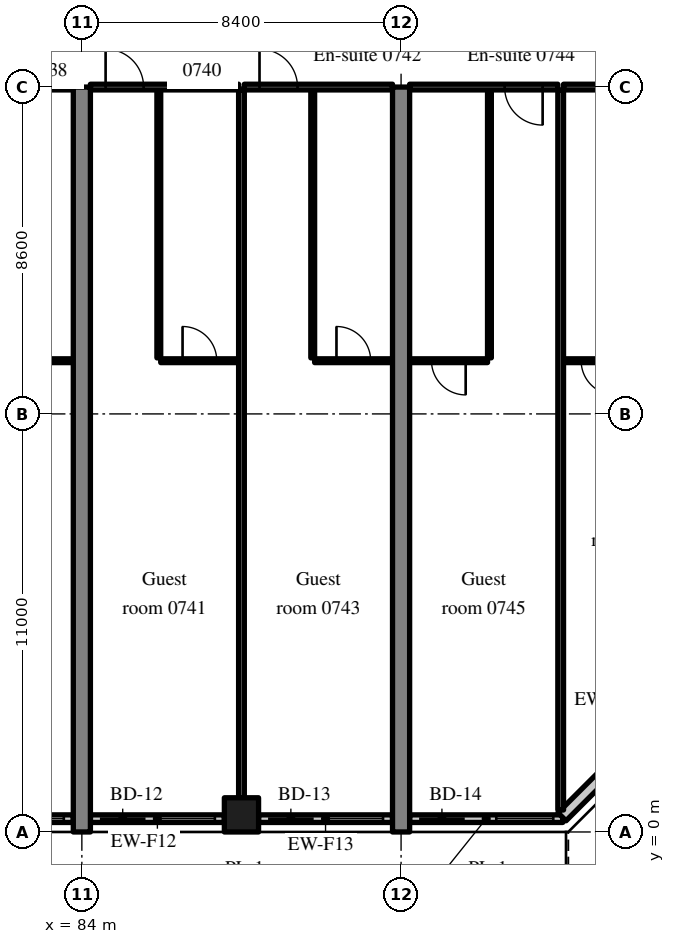
"""IFC4 building model, lengths in metres.
Left out: names, types, materials, properties, quantities, classifications, styles, units other than length and angle.
Written with IfcOpenShell. Run it as: python <this file> out.ifc"""

import sys

from ifc_helpers import new_model, si_unit, direction, frame, frame_2d, origin, origin_2d, place, context, subcontext, project, spatial, rectangle, extrude, source, transform, mapped, element, fill, save


model = new_model("IFC4")
c1 = context("Model", 3, precision=1e-05, world=origin(), true_north=direction((0.0, 1.0)))
c2 = subcontext(c1, "Body", "Model", "MODEL_VIEW")
j1 = project(units=[si_unit("LENGTHUNIT", "METRE"), si_unit("PLANEANGLEUNIT", "RADIAN")], contexts=[c1])
p1 = place(None, origin())
s1 = spatial("IfcSite", under=j1, at=p1, CompositionType="ELEMENT")
p2 = place(p1, origin())
s2 = spatial("IfcBuilding", under=s1, at=p2, CompositionType="ELEMENT")
p3 = place(p2, frame((0.0, 0.0, 35.4)))
s3 = spatial("IfcBuildingStorey", under=s2, at=p3, CompositionType="ELEMENT", Elevation=35.4)
m1 = source(origin(), c2, "Body", "SweptSolid", [
    extrude(rectangle(XDim=19.6, YDim=0.45, at=frame_2d((9.8, 0.0))), origin(), (0.0, 0.0, 1.0), 3.52),
])
for number, where, z_axis, x_axis in (
    (1, (84.0, 0.0, 0.0), (0.0, 0.0, 1.0), (0.0, 1.0, 0.0)),
    (2, (92.4, 0.0, 0.0), (0.0, 0.0, 1.0), (0.0, 1.0, 0.0)),
):
    element("IfcWall", number, at=place(p3, frame(where, z_axis=z_axis, x_axis=x_axis)), inside=s3, PredefinedType="SHEAR", context=c2, shape_type="MappedRepresentation", body=[
        mapped(m1, transform((0.0, 0.0, 0.0), scale=1.0)),
    ])
m2 = source(origin(), c2, "Body", "SweptSolid", [
    extrude(rectangle(XDim=0.9, YDim=0.9, at=origin_2d()), origin(), (0.0, 0.0, 1.0), 3.52),
])
p4 = place(p3, frame((88.2, 0.45, 0.0), z_axis=(0.0, 0.0, 1.0), x_axis=(1.0, 0.0, 0.0)))
e3 = element("IfcColumn", 3, at=p4, inside=s3, PredefinedType="COLUMN", context=c2, shape_type="MappedRepresentation", body=[
    mapped(m2, transform((0.0, 0.0, 0.0), scale=1.0)),
])
m3 = source(origin(), c2, "Body", "SweptSolid", [
    extrude(rectangle(XDim=3.525, YDim=0.2, at=frame_2d((1.762, 0.0))), origin(), (0.0, 0.0, 1.0), 2.77),
])
p5 = place(p3, frame((80.25, 0.35, 0.0), z_axis=(0.0, 0.0, 1.0), x_axis=(1.0, 0.0, 0.0)))
e4 = element("IfcWall", 4, at=p5, inside=s3, PredefinedType="SOLIDWALL", context=c2, shape_type="MappedRepresentation", body=[
    mapped(m3, transform((0.0, 0.0, 0.0), scale=1.0)),
])
m4 = source(origin(), c2, "Body", "SweptSolid", [
    extrude(rectangle(XDim=1.2, YDim=2.4, at=frame_2d((0.6, 1.2))), frame((0.0, 0.11, 0.0), z_axis=(0.0, -1.0, 0.0), x_axis=(1.0, 0.0, 0.0)), (0.0, 0.0, 1.0), 0.22),
])
p6 = place(p5, frame((0.25, 0.0, 0.0)))
e5 = element("IfcOpeningElement", 5, at=p6, cuts=e4, PredefinedType="OPENING", context=c2, shape_type="MappedRepresentation", body=[
    mapped(m4, transform((0.0, 0.0, 0.0), scale=1.0)),
])
m5 = source(origin(), c2, "Body", "SweptSolid", [
    extrude(rectangle(XDim=1.5, YDim=1.5, at=frame_2d((0.75, 0.75))), frame((0.0, 0.11, 0.0), z_axis=(0.0, -1.0, 0.0), x_axis=(1.0, 0.0, 0.0)), (0.0, 0.0, 1.0), 0.22),
])
p7 = place(p5, frame((1.775, 0.0, 0.9)))
e6 = element("IfcOpeningElement", 6, at=p7, cuts=e4, PredefinedType="OPENING", context=c2, shape_type="MappedRepresentation", body=[
    mapped(m5, transform((0.0, 0.0, 0.0), scale=1.0)),
])
p8 = place(p3, frame((84.225, 0.35, 0.0), z_axis=(0.0, 0.0, 1.0), x_axis=(1.0, 0.0, 0.0)))
e7 = element("IfcWall", 7, at=p8, inside=s3, PredefinedType="SOLIDWALL", context=c2, shape_type="MappedRepresentation", body=[
    mapped(m3, transform((0.0, 0.0, 0.0), scale=1.0)),
])
p9 = place(p8, frame((0.25, 0.0, 0.0)))
e8 = element("IfcOpeningElement", 8, at=p9, cuts=e7, PredefinedType="OPENING", context=c2, shape_type="MappedRepresentation", body=[
    mapped(m4, transform((0.0, 0.0, 0.0), scale=1.0)),
])
p10 = place(p8, frame((1.775, 0.0, 0.9)))
e9 = element("IfcOpeningElement", 9, at=p10, cuts=e7, PredefinedType="OPENING", context=c2, shape_type="MappedRepresentation", body=[
    mapped(m5, transform((0.0, 0.0, 0.0), scale=1.0)),
])
m6 = source(origin(), c2, "Body", "SweptSolid", [
    extrude(rectangle(XDim=3.525, YDim=0.2, at=frame_2d((1.763, 0.0))), origin(), (0.0, 0.0, 1.0), 2.77),
])
p11 = place(p3, frame((88.65, 0.35, 0.0), z_axis=(0.0, 0.0, 1.0), x_axis=(1.0, 0.0, 0.0)))
e10 = element("IfcWall", 10, at=p11, inside=s3, PredefinedType="SOLIDWALL", context=c2, shape_type="MappedRepresentation", body=[
    mapped(m6, transform((0.0, 0.0, 0.0), scale=1.0)),
])
p12 = place(p11, frame((0.25, 0.0, 0.0)))
e11 = element("IfcOpeningElement", 11, at=p12, cuts=e10, PredefinedType="OPENING", context=c2, shape_type="MappedRepresentation", body=[
    mapped(m4, transform((0.0, 0.0, 0.0), scale=1.0)),
])
p13 = place(p11, frame((1.775, 0.0, 0.9)))
e12 = element("IfcOpeningElement", 12, at=p13, cuts=e10, PredefinedType="OPENING", context=c2, shape_type="MappedRepresentation", body=[
    mapped(m5, transform((0.0, 0.0, 0.0), scale=1.0)),
])
m7 = source(origin(), c2, "Body", "SweptSolid", [
    extrude(rectangle(XDim=4.03, YDim=0.2, at=frame_2d((2.015, 0.0))), origin(), (0.0, 0.0, 1.0), 2.77),
])
p14 = place(p3, frame((92.625, 0.35, 0.0), z_axis=(0.0, 0.0, 1.0), x_axis=(1.0, 0.0, 0.0)))
e13 = element("IfcWall", 13, at=p14, inside=s3, PredefinedType="SOLIDWALL", context=c2, shape_type="MappedRepresentation", body=[
    mapped(m7, transform((0.0, 0.0, 0.0), scale=1.0)),
])
p15 = place(p14, frame((0.25, 0.0, 0.0)))
e14 = element("IfcOpeningElement", 14, at=p15, cuts=e13, PredefinedType="OPENING", context=c2, shape_type="MappedRepresentation", body=[
    mapped(m4, transform((0.0, 0.0, 0.0), scale=1.0)),
])
p16 = place(p14, frame((2.28, 0.0, 0.9)))
e15 = element("IfcOpeningElement", 15, at=p16, cuts=e13, PredefinedType="OPENING", context=c2, shape_type="MappedRepresentation", body=[
    mapped(m5, transform((0.0, 0.0, 0.0), scale=1.0)),
])
m8 = source(origin(), c2, "Body", "SweptSolid", [
    extrude(rectangle(XDim=5.326, YDim=0.3, at=frame_2d((2.663, 0.0))), origin(), (0.0, 0.0, 1.0), 3.52),
])
p17 = place(p3, frame((96.634, 0.4, 0.0), z_axis=(0.0, 0.0, 1.0), x_axis=(0.707083859269, 0.707129702361, 0.0)))
e16 = element("IfcWall", 16, at=p17, inside=s3, PredefinedType="SOLIDWALL", context=c2, shape_type="MappedRepresentation", body=[
    mapped(m8, transform((0.0, 0.0, 0.0), scale=1.0)),
])
m9 = source(origin(), c2, "Body", "SweptSolid", [
    extrude(rectangle(XDim=1.8, YDim=1.5, at=frame_2d((0.9, 0.75))), frame((0.0, 0.16, 0.0), z_axis=(0.0, -1.0, 0.0), x_axis=(1.0, 0.0, 0.0)), (0.0, 0.0, 1.0), 0.32),
])
p18 = place(p17, frame((1.636, 0.0, 0.9)))
e17 = element("IfcOpeningElement", 17, at=p18, cuts=e16, PredefinedType="OPENING", context=c2, shape_type="MappedRepresentation", body=[
    mapped(m9, transform((0.0, 0.0, 0.0), scale=1.0)),
])
m10 = source(origin(), c2, "Body", "SweptSolid", [
    extrude(rectangle(XDim=2.05, YDim=0.1, at=frame_2d((1.025, 0.0))), origin(), (0.0, 0.0, 1.0), 3.52),
])
p19 = place(p3, frame((81.725, 12.4, 0.0), z_axis=(0.0, 0.0, 1.0), x_axis=(1.0, 0.0, 0.0)))
e18 = element("IfcWall", 18, at=p19, inside=s3, PredefinedType="PARTITIONING", context=c2, shape_type="MappedRepresentation", body=[
    mapped(m10, transform((0.0, 0.0, 0.0), scale=1.0)),
])
m11 = source(origin(), c2, "Body", "SweptSolid", [
    extrude(rectangle(XDim=0.9, YDim=2.1, at=frame_2d((0.45, 1.05))), frame((0.0, 0.06, 0.0), z_axis=(0.0, -1.0, 0.0), x_axis=(1.0, 0.0, 0.0)), (0.0, 0.0, 1.0), 0.12),
])
p20 = place(p19, frame((0.575, 0.0, 0.0)))
e19 = element("IfcOpeningElement", 19, at=p20, cuts=e18, PredefinedType="OPENING", context=c2, shape_type="MappedRepresentation", body=[
    mapped(m11, transform((0.0, 0.0, 0.0), scale=1.0)),
])
m12 = source(origin(), c2, "Body", "SweptSolid", [
    extrude(rectangle(XDim=3.9, YDim=0.15, at=frame_2d((1.95, 0.0))), origin(), (0.0, 0.0, 1.0), 2.82),
])
p21 = place(p3, frame((79.875, 19.6, 0.0), z_axis=(0.0, 0.0, 1.0), x_axis=(1.0, 0.0, 0.0)))
e20 = element("IfcWall", 20, at=p21, inside=s3, PredefinedType="PARTITIONING", context=c2, shape_type="MappedRepresentation", body=[
    mapped(m12, transform((0.0, 0.0, 0.0), scale=1.0)),
])
m13 = source(origin(), c2, "Body", "SweptSolid", [
    extrude(rectangle(XDim=1.0, YDim=2.1, at=frame_2d((0.5, 1.05))), frame((0.0, 0.085, 0.0), z_axis=(0.0, -1.0, 0.0), x_axis=(1.0, 0.0, 0.0)), (0.0, 0.0, 1.0), 0.17),
])
p22 = place(p21, frame((0.4, 0.0, 0.0)))
e21 = element("IfcOpeningElement", 21, at=p22, cuts=e20, PredefinedType="OPENING", context=c2, shape_type="MappedRepresentation", body=[
    mapped(m13, transform((0.0, 0.0, 0.0), scale=1.0)),
])
m14 = source(origin(), c2, "Body", "SweptSolid", [
    extrude(rectangle(XDim=7.05, YDim=0.1, at=frame_2d((3.525, 0.0))), origin(), (0.0, 0.0, 1.0), 3.52),
])
p23 = place(p3, frame((86.025, 12.475, 0.0), z_axis=(0.0, 0.0, 1.0), x_axis=(0.0, 1.0, 0.0)))
e22 = element("IfcWall", 22, at=p23, inside=s3, PredefinedType="PARTITIONING", context=c2, shape_type="MappedRepresentation", body=[
    mapped(m14, transform((0.0, 0.0, 0.0), scale=1.0)),
])
m15 = source(origin(), c2, "Body", "SweptSolid", [
    extrude(rectangle(XDim=2.05, YDim=0.1, at=frame_2d((1.025, 0.0))), origin(), (0.0, 0.0, 1.0), 3.52),
])
p24 = place(p3, frame((86.075, 12.4, 0.0), z_axis=(0.0, 0.0, 1.0), x_axis=(1.0, 0.0, 0.0)))
e23 = element("IfcWall", 23, at=p24, inside=s3, PredefinedType="PARTITIONING", context=c2, shape_type="MappedRepresentation", body=[
    mapped(m15, transform((0.0, 0.0, 0.0), scale=1.0)),
])
p25 = place(p24, frame((0.575, 0.0, 0.0)))
e24 = element("IfcOpeningElement", 24, at=p25, cuts=e23, PredefinedType="OPENING", context=c2, shape_type="MappedRepresentation", body=[
    mapped(m11, transform((0.0, 0.0, 0.0), scale=1.0)),
])
p26 = place(p3, frame((84.225, 19.6, 0.0), z_axis=(0.0, 0.0, 1.0), x_axis=(1.0, 0.0, 0.0)))
e25 = element("IfcWall", 25, at=p26, inside=s3, PredefinedType="PARTITIONING", context=c2, shape_type="MappedRepresentation", body=[
    mapped(m12, transform((0.0, 0.0, 0.0), scale=1.0)),
])
p27 = place(p26, frame((0.4, 0.0, 0.0)))
e26 = element("IfcOpeningElement", 26, at=p27, cuts=e25, PredefinedType="OPENING", context=c2, shape_type="MappedRepresentation", body=[
    mapped(m13, transform((0.0, 0.0, 0.0), scale=1.0)),
])
p28 = place(p3, frame((90.075, 12.475, 0.0), z_axis=(0.0, 0.0, 1.0), x_axis=(0.0, 1.0, 0.0)))
e27 = element("IfcWall", 27, at=p28, inside=s3, PredefinedType="PARTITIONING", context=c2, shape_type="MappedRepresentation", body=[
    mapped(m14, transform((0.0, 0.0, 0.0), scale=1.0)),
])
p29 = place(p3, frame((90.125, 12.4, 0.0), z_axis=(0.0, 0.0, 1.0), x_axis=(1.0, 0.0, 0.0)))
e28 = element("IfcWall", 28, at=p29, inside=s3, PredefinedType="PARTITIONING", context=c2, shape_type="MappedRepresentation", body=[
    mapped(m15, transform((0.0, 0.0, 0.0), scale=1.0)),
])
p30 = place(p29, frame((0.575, 0.0, 0.0)))
e29 = element("IfcOpeningElement", 29, at=p30, cuts=e28, PredefinedType="OPENING", context=c2, shape_type="MappedRepresentation", body=[
    mapped(m11, transform((0.0, 0.0, 0.0), scale=1.0)),
])
m16 = source(origin(), c2, "Body", "SweptSolid", [
    extrude(rectangle(XDim=3.9, YDim=0.15, at=frame_2d((1.95, 0.0))), origin(), (0.0, 0.0, 1.0), 2.82),
])
p31 = place(p3, frame((88.275, 19.6, 0.0), z_axis=(0.0, 0.0, 1.0), x_axis=(1.0, 0.0, 0.0)))
e30 = element("IfcWall", 30, at=p31, inside=s3, PredefinedType="PARTITIONING", context=c2, shape_type="MappedRepresentation", body=[
    mapped(m16, transform((0.0, 0.0, 0.0), scale=1.0)),
])
p32 = place(p31, frame((0.4, 0.0, 0.0)))
e31 = element("IfcOpeningElement", 31, at=p32, cuts=e30, PredefinedType="OPENING", context=c2, shape_type="MappedRepresentation", body=[
    mapped(m13, transform((0.0, 0.0, 0.0), scale=1.0)),
])
m17 = source(origin(), c2, "Body", "SweptSolid", [
    extrude(rectangle(XDim=18.625, YDim=0.15, at=frame_2d((9.312, 0.0))), origin(), (0.0, 0.0, 1.0), 3.52),
])
p33 = place(p3, frame((88.2, 0.9, 0.0), z_axis=(0.0, 0.0, 1.0), x_axis=(0.0, 1.0, 0.0)))
e32 = element("IfcWall", 32, at=p33, inside=s3, PredefinedType="PARTITIONING", context=c2, shape_type="MappedRepresentation", body=[
    mapped(m17, transform((0.0, 0.0, 0.0), scale=1.0)),
])
p34 = place(p3, frame((94.725, 12.475, 0.0), z_axis=(0.0, 0.0, 1.0), x_axis=(0.0, 1.0, 0.0)))
e33 = element("IfcWall", 33, at=p34, inside=s3, PredefinedType="PARTITIONING", context=c2, shape_type="MappedRepresentation", body=[
    mapped(m14, transform((0.0, 0.0, 0.0), scale=1.0)),
])
p35 = place(p3, frame((92.625, 12.4, 0.0), z_axis=(0.0, 0.0, 1.0), x_axis=(1.0, 0.0, 0.0)))
e34 = element("IfcWall", 34, at=p35, inside=s3, PredefinedType="PARTITIONING", context=c2, shape_type="MappedRepresentation", body=[
    mapped(m15, transform((0.0, 0.0, 0.0), scale=1.0)),
])
p36 = place(p35, frame((0.575, 0.0, 0.0)))
e35 = element("IfcOpeningElement", 35, at=p36, cuts=e34, PredefinedType="OPENING", context=c2, shape_type="MappedRepresentation", body=[
    mapped(m11, transform((0.0, 0.0, 0.0), scale=1.0)),
])
p37 = place(p3, frame((92.625, 19.6, 0.0), z_axis=(0.0, 0.0, 1.0), x_axis=(1.0, 0.0, 0.0)))
e36 = element("IfcWall", 36, at=p37, inside=s3, PredefinedType="PARTITIONING", context=c2, shape_type="MappedRepresentation", body=[
    mapped(m12, transform((0.0, 0.0, 0.0), scale=1.0)),
])
p38 = place(p37, frame((2.5, 0.0, 0.0)))
e37 = element("IfcOpeningElement", 37, at=p38, cuts=e36, PredefinedType="OPENING", context=c2, shape_type="MappedRepresentation", body=[
    mapped(m13, transform((0.0, 0.0, 0.0), scale=1.0)),
])
m18 = source(origin(), c2, "Body", "SweptSolid", [
    extrude(rectangle(XDim=1.825, YDim=0.1, at=frame_2d((0.913, 0.0))), origin(), (0.0, 0.0, 1.0), 3.52),
])
p39 = place(p3, frame((96.675, 12.4, 0.0), z_axis=(0.0, 0.0, 1.0), x_axis=(1.0, 0.0, 0.0)))
e38 = element("IfcWall", 38, at=p39, inside=s3, PredefinedType="PARTITIONING", context=c2, shape_type="MappedRepresentation", body=[
    mapped(m18, transform((0.0, 0.0, 0.0), scale=1.0)),
])
p40 = place(p39, frame((0.463, 0.0, 0.0)))
e39 = element("IfcOpeningElement", 39, at=p40, cuts=e38, PredefinedType="OPENING", context=c2, shape_type="MappedRepresentation", body=[
    mapped(m11, transform((0.0, 0.0, 0.0), scale=1.0)),
])
m19 = source(origin(), c2, "Body", "SweptSolid", [
    extrude(rectangle(XDim=3.675, YDim=0.15, at=frame_2d((1.837, 0.0))), origin(), (0.0, 0.0, 1.0), 2.82),
])
p41 = place(p3, frame((96.675, 19.6, 0.0), z_axis=(0.0, 0.0, 1.0), x_axis=(1.0, 0.0, 0.0)))
e40 = element("IfcWall", 40, at=p41, inside=s3, PredefinedType="PARTITIONING", context=c2, shape_type="MappedRepresentation", body=[
    mapped(m19, transform((0.0, 0.0, 0.0), scale=1.0)),
])
p42 = place(p41, frame((2.275, 0.0, 0.0)))
e41 = element("IfcOpeningElement", 41, at=p42, cuts=e40, PredefinedType="OPENING", context=c2, shape_type="MappedRepresentation", body=[
    mapped(m13, transform((0.0, 0.0, 0.0), scale=1.0)),
])
m20 = source(origin(), c2, "Body", "SweptSolid", [
    extrude(rectangle(XDim=18.947, YDim=0.15, at=frame_2d((9.474, 0.0))), origin(), (0.0, 0.0, 1.0), 3.52),
])
p43 = place(p3, frame((96.6, 0.578, 0.0), z_axis=(0.0, 0.0, 1.0), x_axis=(0.0, 1.0, 0.0)))
e42 = element("IfcWall", 42, at=p43, inside=s3, PredefinedType="PARTITIONING", context=c2, shape_type="MappedRepresentation", body=[
    mapped(m20, transform((0.0, 0.0, 0.0), scale=1.0)),
])
m21 = source(origin(), c2, "Body", "SweptSolid", [
    extrude(rectangle(XDim=1.5, YDim=1.5, at=frame_2d((0.75, 0.75))), frame((0.0, 0.03, 0.0), z_axis=(0.0, -1.0, 0.0), x_axis=(1.0, 0.0, 0.0)), (0.0, 0.0, 1.0), 0.06),
])
p44 = place(p7, origin())
e43 = element("IfcWindow", 43, at=p44, inside=s3, PartitioningType="SINGLE_PANEL", PredefinedType="WINDOW", context=c2, shape_type="MappedRepresentation", body=[
    mapped(m21, transform((0.0, 0.0, 0.0), scale=1.0)),
])
fill(e6, e43)
m22 = source(origin(), c2, "Body", "SweptSolid", [
    extrude(rectangle(XDim=1.2, YDim=2.4, at=frame_2d((0.6, 1.2))), frame((0.0, 0.025, 0.0), z_axis=(0.0, -1.0, 0.0), x_axis=(1.0, 0.0, 0.0)), (0.0, 0.0, 1.0), 0.05),
])
p45 = place(p9, origin())
e44 = element("IfcDoor", 44, at=p45, inside=s3, OperationType="SLIDING_TO_RIGHT", PredefinedType="DOOR", context=c2, shape_type="MappedRepresentation", body=[
    mapped(m22, transform((0.0, 0.0, 0.0), scale=1.0)),
])
fill(e8, e44)
p46 = place(p10, origin())
e45 = element("IfcWindow", 45, at=p46, inside=s3, PartitioningType="SINGLE_PANEL", PredefinedType="WINDOW", context=c2, shape_type="MappedRepresentation", body=[
    mapped(m21, transform((0.0, 0.0, 0.0), scale=1.0)),
])
fill(e9, e45)
p47 = place(p12, origin())
e46 = element("IfcDoor", 46, at=p47, inside=s3, OperationType="SLIDING_TO_LEFT", PredefinedType="DOOR", context=c2, shape_type="MappedRepresentation", body=[
    mapped(m22, transform((0.0, 0.0, 0.0), scale=1.0)),
])
fill(e11, e46)
p48 = place(p13, origin())
e47 = element("IfcWindow", 47, at=p48, inside=s3, PartitioningType="SINGLE_PANEL", PredefinedType="WINDOW", context=c2, shape_type="MappedRepresentation", body=[
    mapped(m21, transform((0.0, 0.0, 0.0), scale=1.0)),
])
fill(e12, e47)
p49 = place(p15, origin())
e48 = element("IfcDoor", 48, at=p49, inside=s3, OperationType="SLIDING_TO_RIGHT", PredefinedType="DOOR", context=c2, shape_type="MappedRepresentation", body=[
    mapped(m22, transform((0.0, 0.0, 0.0), scale=1.0)),
])
fill(e14, e48)
p50 = place(p16, origin())
e49 = element("IfcWindow", 49, at=p50, inside=s3, PartitioningType="SINGLE_PANEL", PredefinedType="WINDOW", context=c2, shape_type="MappedRepresentation", body=[
    mapped(m21, transform((0.0, 0.0, 0.0), scale=1.0)),
])
fill(e15, e49)
m23 = source(origin(), c2, "Body", "SweptSolid", [
    extrude(rectangle(XDim=0.9, YDim=2.1, at=frame_2d((0.45, 1.05))), frame((0.0, 0.025, 0.0), z_axis=(0.0, -1.0, 0.0), x_axis=(1.0, 0.0, 0.0)), (0.0, 0.0, 1.0), 0.05),
])
p51 = place(p25, origin())
e50 = element("IfcDoor", 50, at=p51, inside=s3, OperationType="SINGLE_SWING_LEFT", PredefinedType="DOOR", context=c2, shape_type="MappedRepresentation", body=[
    mapped(m23, transform((0.0, 0.0, 0.0), scale=1.0)),
])
fill(e24, e50)
m24 = source(origin(), c2, "Body", "SweptSolid", [
    extrude(rectangle(XDim=1.0, YDim=2.1, at=frame_2d((0.5, 1.05))), frame((0.0, 0.025, 0.0), z_axis=(0.0, -1.0, 0.0), x_axis=(1.0, 0.0, 0.0)), (0.0, 0.0, 1.0), 0.05),
])
p52 = place(p27, origin())
e51 = element("IfcDoor", 51, at=p52, inside=s3, OperationType="SINGLE_SWING_LEFT", PredefinedType="DOOR", context=c2, shape_type="MappedRepresentation", body=[
    mapped(m24, transform((0.0, 0.0, 0.0), scale=1.0)),
])
fill(e26, e51)
p53 = place(p30, origin())
e52 = element("IfcDoor", 52, at=p53, inside=s3, OperationType="SINGLE_SWING_LEFT", PredefinedType="DOOR", context=c2, shape_type="MappedRepresentation", body=[
    mapped(m23, transform((0.0, 0.0, 0.0), scale=1.0)),
])
fill(e29, e52)
p54 = place(p32, origin())
e53 = element("IfcDoor", 53, at=p54, inside=s3, OperationType="SINGLE_SWING_LEFT", PredefinedType="DOOR", context=c2, shape_type="MappedRepresentation", body=[
    mapped(m24, transform((0.0, 0.0, 0.0), scale=1.0)),
])
fill(e31, e53)
p55 = place(p36, origin())
e54 = element("IfcDoor", 54, at=p55, inside=s3, OperationType="SINGLE_SWING_RIGHT", PredefinedType="DOOR", context=c2, shape_type="MappedRepresentation", body=[
    mapped(m23, transform((0.0, 0.0, 0.0), scale=1.0)),
])
fill(e35, e54)
p56 = place(p38, origin())
e55 = element("IfcDoor", 55, at=p56, inside=s3, OperationType="SINGLE_SWING_RIGHT", PredefinedType="DOOR", context=c2, shape_type="MappedRepresentation", body=[
    mapped(m24, transform((0.0, 0.0, 0.0), scale=1.0)),
])
fill(e37, e55)
p57 = place(p40, origin())
e56 = element("IfcDoor", 56, at=p57, inside=s3, OperationType="SINGLE_SWING_RIGHT", PredefinedType="DOOR", context=c2, shape_type="MappedRepresentation", body=[
    mapped(m23, transform((0.0, 0.0, 0.0), scale=1.0)),
])
fill(e39, e56)
save(model, sys.argv[1])
